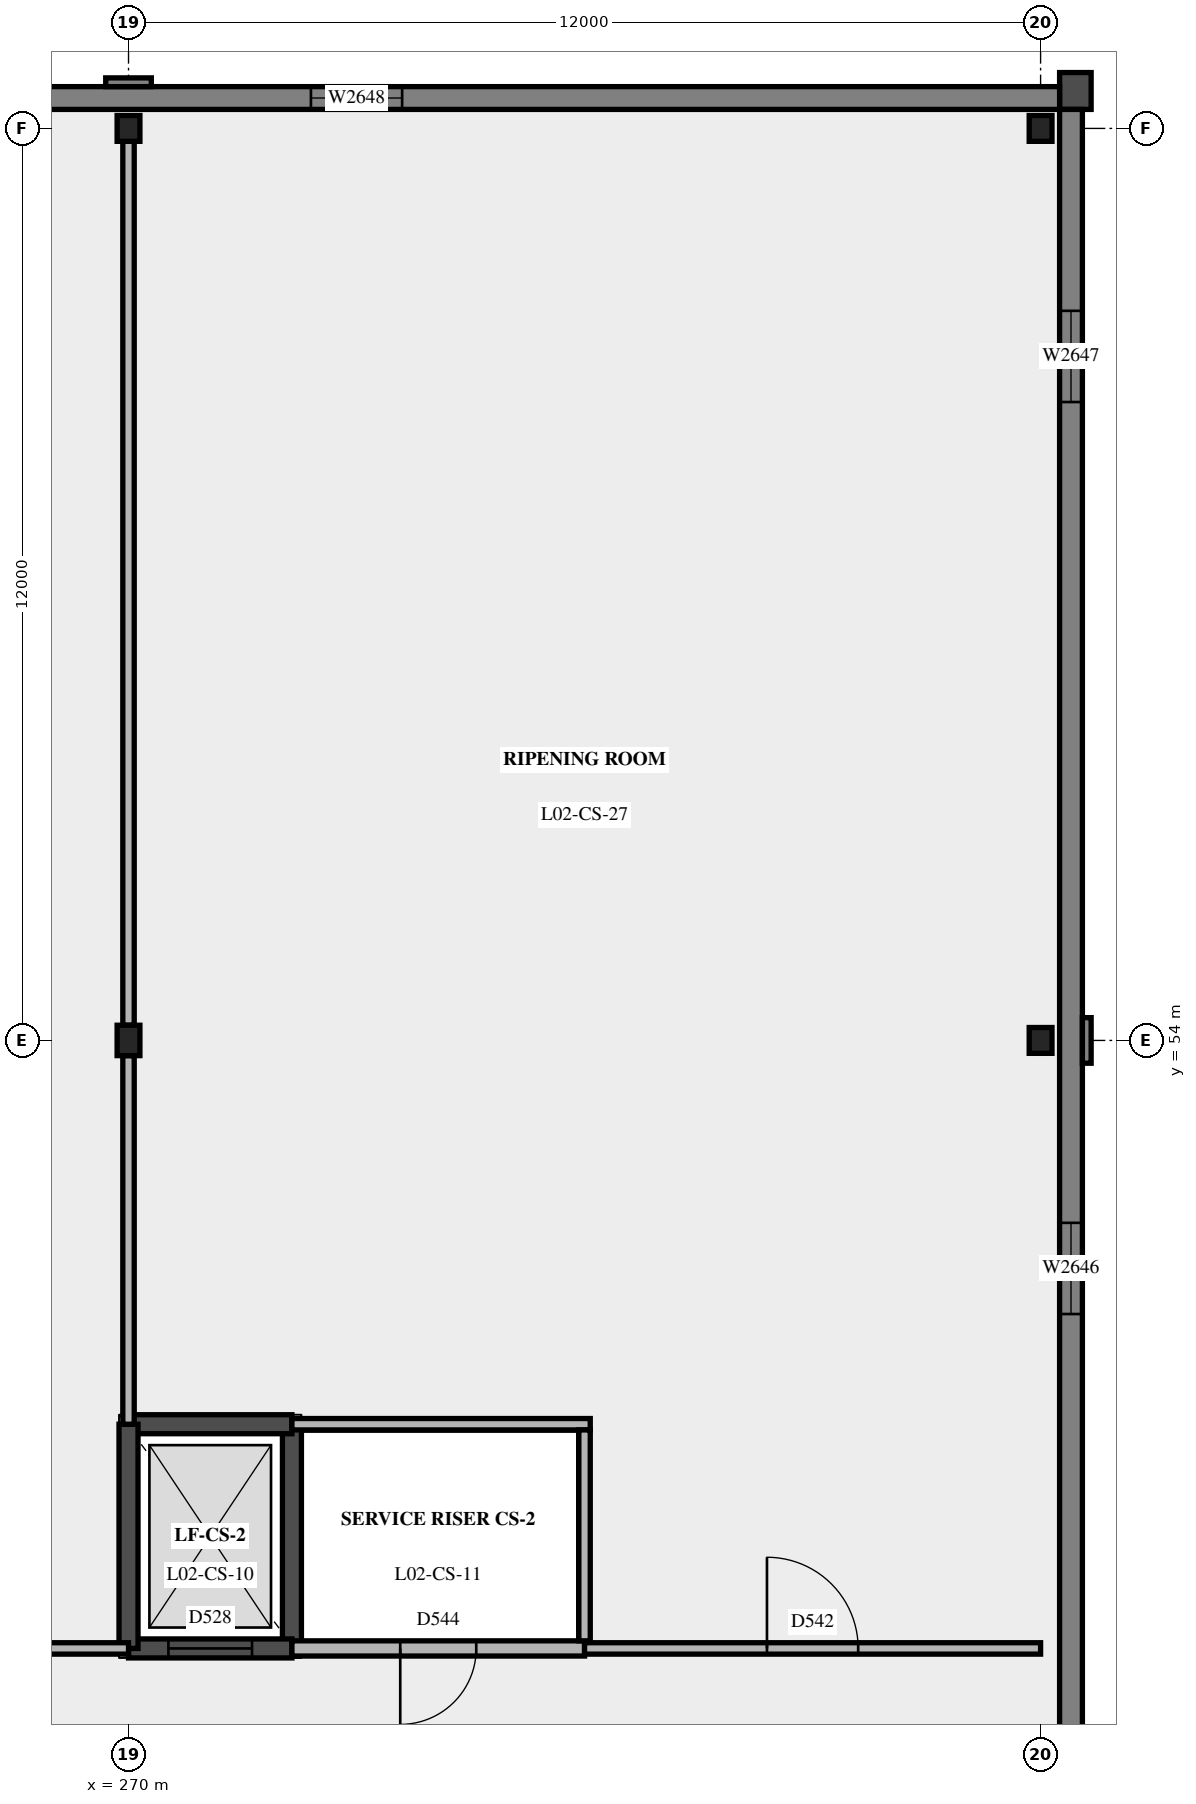
"""IFC4 building model, lengths in metres.
Left out: names, types, materials, properties, quantities, classifications, styles, units other than length and angle.
Written with IfcOpenShell. Run it as: python <this file> out.ifc"""

import sys

from ifc_helpers import new_model, si_unit, direction, frame, frame_2d, origin, origin_2d, place, context, subcontext, project, spatial, polyline, rectangle, i_section, outline, extrude, element, fill, save


model = new_model("IFC4")
c1 = context("Model", 3, precision=1e-05, world=origin(), true_north=direction((0.0, 1.0)))
c2 = subcontext(c1, "Body", "Model", "MODEL_VIEW")
j1 = project(units=[si_unit("LENGTHUNIT", "METRE"), si_unit("PLANEANGLEUNIT", "RADIAN")], contexts=[c1])
p1 = place(None, origin())
s1 = spatial("IfcSite", under=j1, at=p1, CompositionType="ELEMENT")
p2 = place(p1, origin())
s2 = spatial("IfcBuilding", under=s1, at=p2, CompositionType="ELEMENT")
p3 = place(p2, frame((0.0, 0.0, 10.8)))
s3 = spatial("IfcBuildingStorey", under=s2, at=p3, CompositionType="ELEMENT", Elevation=10.8)
p4 = place(p3, frame((270.0, 54.0, 0.0), z_axis=(0.0, 0.0, 1.0), x_axis=(1.0, 0.0, 0.0)))
e1 = element("IfcColumn", 1, at=p4, inside=s3, PredefinedType="COLUMN", context=c2, shape_type="SweptSolid", body=[
    extrude(i_section(OverallWidth=0.3, OverallDepth=0.4, WebThickness=0.013, FlangeThickness=0.024, at=origin_2d()), origin(), (0.0, 0.0, 1.0), 5.4),
])
for number, where, z_axis, x_axis in (
    (2, (270.0, 66.0, 0.0), (0.0, 0.0, 1.0), (1.0, 0.0, 0.0)),
    (3, (282.0, 54.0, 0.0), (0.0, 0.0, 1.0), (1.0, 0.0, 0.0)),
    (4, (282.0, 66.0, 0.0), (0.0, 0.0, 1.0), (1.0, 0.0, 0.0)),
):
    element("IfcColumn", number, at=place(p3, frame(where, z_axis=z_axis, x_axis=x_axis)), inside=s3, PredefinedType="COLUMN", context=c2, shape_type="SweptSolid", body=[
        extrude(i_section(OverallWidth=0.3, OverallDepth=0.34, WebThickness=0.012, FlangeThickness=0.021, at=origin_2d()), origin(), (0.0, 0.0, 1.0), 5.4),
    ])
p5 = place(p3, frame((282.25, 66.492, 0.0), z_axis=(0.0, 0.0, 1.0), x_axis=(1.0, 0.0, 0.0)))
e5 = element("IfcWall", 5, at=p5, inside=s3, PredefinedType="SOLIDWALL", context=c2, shape_type="SweptSolid", body=[
    extrude(rectangle(XDim=0.415, YDim=0.485, at=frame_2d((0.208, 0.0))), origin(), (0.0, 0.0, 1.0), 5.01),
])
p6 = place(p3, frame((282.25, 66.528, 5.01), z_axis=(0.0, 0.0, 1.0), x_axis=(1.0, 0.0, 0.0)))
e6 = element("IfcWall", 6, at=p6, inside=s3, PredefinedType="SOLIDWALL", context=c2, shape_type="SweptSolid", body=[
    extrude(rectangle(XDim=0.53, YDim=0.555, at=frame_2d((0.265, 0.0))), origin(), (0.0, 0.0, 1.0), 0.13),
])
p7 = place(p3, frame((282.25, 66.562, 5.14), z_axis=(0.0, 0.0, 1.0), x_axis=(1.0, 0.0, 0.0)))
e7 = element("IfcWall", 7, at=p7, inside=s3, PredefinedType="SOLIDWALL", context=c2, shape_type="SweptSolid", body=[
    extrude(rectangle(XDim=0.645, YDim=0.625, at=frame_2d((0.323, 0.0))), origin(), (0.0, 0.0, 1.0), 0.13),
])
p8 = place(p3, frame((282.25, 66.597, 5.27), z_axis=(0.0, 0.0, 1.0), x_axis=(1.0, 0.0, 0.0)))
e8 = element("IfcWall", 8, at=p8, inside=s3, PredefinedType="SOLIDWALL", context=c2, shape_type="SweptSolid", body=[
    extrude(rectangle(XDim=0.76, YDim=0.695, at=frame_2d((0.38, 0.0))), origin(), (0.0, 0.0, 1.0), 0.13),
])
p9 = place(p3, frame((282.4, 17.75, 0.0), z_axis=(0.0, 0.0, 1.0), x_axis=(0.0, 1.0, 0.0)))
e9 = element("IfcWall", 9, at=p9, inside=s3, PredefinedType="SOLIDWALL", context=c2, shape_type="SweptSolid", body=[
    extrude(rectangle(XDim=48.5, YDim=0.3, at=frame_2d((24.25, 0.0))), origin(), (0.0, 0.0, 1.0), 5.4),
])
p10 = place(p9, frame((8.65, 0.0, 1.2)))
e10 = element("IfcOpeningElement", 10, at=p10, cuts=e9, PredefinedType="OPENING", context=c2, shape_type="SweptSolid", body=[
    extrude(rectangle(XDim=1.2, YDim=1.5, at=frame_2d((0.6, 0.75))), frame((0.0, 0.16, 0.0), z_axis=(0.0, -1.0, 0.0), x_axis=(1.0, 0.0, 0.0)), (0.0, 0.0, 1.0), 0.32),
])
p11 = place(p9, frame((20.65, 0.0, 1.2)))
e11 = element("IfcOpeningElement", 11, at=p11, cuts=e9, PredefinedType="OPENING", context=c2, shape_type="SweptSolid", body=[
    extrude(rectangle(XDim=1.2, YDim=1.5, at=frame_2d((0.6, 0.75))), frame((0.0, 0.16, 0.0), z_axis=(0.0, -1.0, 0.0), x_axis=(1.0, 0.0, 0.0)), (0.0, 0.0, 1.0), 0.32),
])
p12 = place(p9, frame((32.65, 0.0, 1.2)))
e12 = element("IfcOpeningElement", 12, at=p12, cuts=e9, PredefinedType="OPENING", context=c2, shape_type="SweptSolid", body=[
    extrude(rectangle(XDim=1.2, YDim=1.5, at=frame_2d((0.6, 0.75))), frame((0.0, 0.16, 0.0), z_axis=(0.0, -1.0, 0.0), x_axis=(1.0, 0.0, 0.0)), (0.0, 0.0, 1.0), 0.32),
])
p13 = place(p9, frame((44.65, 0.0, 1.2)))
e13 = element("IfcOpeningElement", 13, at=p13, cuts=e9, PredefinedType="OPENING", context=c2, shape_type="SweptSolid", body=[
    extrude(rectangle(XDim=1.2, YDim=1.5, at=frame_2d((0.6, 0.75))), frame((0.0, 0.16, 0.0), z_axis=(0.0, -1.0, 0.0), x_axis=(1.0, 0.0, 0.0)), (0.0, 0.0, 1.0), 0.32),
])
p14 = place(p3, frame((282.607, 53.7, 0.0), z_axis=(0.0, 0.0, 1.0), x_axis=(0.0, 1.0, 0.0)))
e14 = element("IfcWall", 14, at=p14, inside=s3, PredefinedType="SOLIDWALL", context=c2, shape_type="SweptSolid", body=[
    extrude(rectangle(XDim=0.6, YDim=0.115, at=frame_2d((0.3, 0.0))), origin(), (0.0, 0.0, 1.0), 5.4),
])
p15 = place(p3, frame((282.25, 66.4, 0.0), z_axis=(0.0, 0.0, 1.0), x_axis=(-1.0, 0.0, 0.0)))
e15 = element("IfcWall", 15, at=p15, inside=s3, PredefinedType="SOLIDWALL", context=c2, shape_type="SweptSolid", body=[
    extrude(rectangle(XDim=84.5, YDim=0.3, at=frame_2d((42.25, 0.0))), origin(), (0.0, 0.0, 1.0), 5.4),
])
p16 = place(p15, frame((8.65, 0.0, 1.2)))
e16 = element("IfcOpeningElement", 16, at=p16, cuts=e15, PredefinedType="OPENING", context=c2, shape_type="SweptSolid", body=[
    extrude(rectangle(XDim=1.2, YDim=1.5, at=frame_2d((0.6, 0.75))), frame((0.0, 0.16, 0.0), z_axis=(0.0, -1.0, 0.0), x_axis=(1.0, 0.0, 0.0)), (0.0, 0.0, 1.0), 0.32),
])
p17 = place(p15, frame((20.65, 0.0, 1.2)))
e17 = element("IfcOpeningElement", 17, at=p17, cuts=e15, PredefinedType="OPENING", context=c2, shape_type="SweptSolid", body=[
    extrude(rectangle(XDim=1.2, YDim=1.5, at=frame_2d((0.6, 0.75))), frame((0.0, 0.16, 0.0), z_axis=(0.0, -1.0, 0.0), x_axis=(1.0, 0.0, 0.0)), (0.0, 0.0, 1.0), 0.32),
])
p18 = place(p15, frame((32.65, 0.0, 1.2)))
e18 = element("IfcOpeningElement", 18, at=p18, cuts=e15, PredefinedType="OPENING", context=c2, shape_type="SweptSolid", body=[
    extrude(rectangle(XDim=1.2, YDim=1.5, at=frame_2d((0.6, 0.75))), frame((0.0, 0.16, 0.0), z_axis=(0.0, -1.0, 0.0), x_axis=(1.0, 0.0, 0.0)), (0.0, 0.0, 1.0), 0.32),
])
p19 = place(p15, frame((44.65, 0.0, 1.2)))
e19 = element("IfcOpeningElement", 19, at=p19, cuts=e15, PredefinedType="OPENING", context=c2, shape_type="SweptSolid", body=[
    extrude(rectangle(XDim=1.2, YDim=1.5, at=frame_2d((0.6, 0.75))), frame((0.0, 0.16, 0.0), z_axis=(0.0, -1.0, 0.0), x_axis=(1.0, 0.0, 0.0)), (0.0, 0.0, 1.0), 0.32),
])
p20 = place(p15, frame((56.65, 0.0, 1.2)))
e20 = element("IfcOpeningElement", 20, at=p20, cuts=e15, PredefinedType="OPENING", context=c2, shape_type="SweptSolid", body=[
    extrude(rectangle(XDim=1.2, YDim=1.5, at=frame_2d((0.6, 0.75))), frame((0.0, 0.16, 0.0), z_axis=(0.0, -1.0, 0.0), x_axis=(1.0, 0.0, 0.0)), (0.0, 0.0, 1.0), 0.32),
])
p21 = place(p15, frame((68.65, 0.0, 1.2)))
e21 = element("IfcOpeningElement", 21, at=p21, cuts=e15, PredefinedType="OPENING", context=c2, shape_type="SweptSolid", body=[
    extrude(rectangle(XDim=1.2, YDim=1.5, at=frame_2d((0.6, 0.75))), frame((0.0, 0.16, 0.0), z_axis=(0.0, -1.0, 0.0), x_axis=(1.0, 0.0, 0.0)), (0.0, 0.0, 1.0), 0.32),
])
p22 = place(p15, frame((80.65, 0.0, 1.2)))
e22 = element("IfcOpeningElement", 22, at=p22, cuts=e15, PredefinedType="OPENING", context=c2, shape_type="SweptSolid", body=[
    extrude(rectangle(XDim=1.2, YDim=1.5, at=frame_2d((0.6, 0.75))), frame((0.0, 0.16, 0.0), z_axis=(0.0, -1.0, 0.0), x_axis=(1.0, 0.0, 0.0)), (0.0, 0.0, 1.0), 0.32),
])
p23 = place(p3, frame((270.3, 66.607, 0.0), z_axis=(0.0, 0.0, 1.0), x_axis=(-1.0, 0.0, 0.0)))
e23 = element("IfcWall", 23, at=p23, inside=s3, PredefinedType="SOLIDWALL", context=c2, shape_type="SweptSolid", body=[
    extrude(rectangle(XDim=0.6, YDim=0.115, at=frame_2d((0.3, 0.0))), origin(), (0.0, 0.0, 1.0), 5.4),
])
p24 = place(p3, frame((272.15, 46.0, 0.0), z_axis=(0.0, 0.0, 1.0), x_axis=(0.0, 1.0, 0.0)))
e24 = element("IfcWall", 24, at=p24, inside=s3, PredefinedType="SHEAR", context=c2, shape_type="SweptSolid", body=[
    extrude(rectangle(XDim=2.95, YDim=0.25, at=frame_2d((1.475, 0.0))), origin(), (0.0, 0.0, 1.0), 5.15),
])
p25 = place(p3, frame((272.15, 48.95, 0.0), z_axis=(0.0, 0.0, 1.0), x_axis=(-1.0, 0.0, 0.0)))
e25 = element("IfcWall", 25, at=p25, inside=s3, PredefinedType="SHEAR", context=c2, shape_type="SweptSolid", body=[
    extrude(rectangle(XDim=2.15, YDim=0.25, at=frame_2d((1.075, 0.0))), origin(), (0.0, 0.0, 1.0), 5.15),
])
p26 = place(p3, frame((270.0, 46.0, 0.0), z_axis=(0.0, 0.0, 1.0), x_axis=(1.0, 0.0, 0.0)))
e26 = element("IfcWall", 26, at=p26, inside=s3, PredefinedType="SHEAR", context=c2, shape_type="SweptSolid", body=[
    extrude(rectangle(XDim=2.15, YDim=0.25, at=frame_2d((1.075, 0.0))), origin(), (0.0, 0.0, 1.0), 5.15),
])
p27 = place(p26, frame((0.525, 0.0, 0.0)))
e27 = element("IfcOpeningElement", 27, at=p27, cuts=e26, PredefinedType="OPENING", context=c2, shape_type="SweptSolid", body=[
    extrude(rectangle(XDim=1.1, YDim=2.1, at=frame_2d((0.55, 1.05))), frame((0.0, 0.135, 0.0), z_axis=(0.0, -1.0, 0.0), x_axis=(1.0, 0.0, 0.0)), (0.0, 0.0, 1.0), 0.27),
])
p28 = place(p3, frame((270.0, 48.95, 0.0), z_axis=(0.0, 0.0, 1.0), x_axis=(0.0, -1.0, 0.0)))
e28 = element("IfcWall", 28, at=p28, inside=s3, PredefinedType="SHEAR", context=c2, shape_type="SweptSolid", body=[
    extrude(rectangle(XDim=2.95, YDim=0.25, at=frame_2d((1.475, 0.0))), origin(), (0.0, 0.0, 1.0), 5.15),
])
p29 = place(p3, frame((252.0, 46.0, 0.0), z_axis=(0.0, 0.0, 1.0), x_axis=(1.0, 0.0, 0.0)))
e29 = element("IfcWall", 29, at=p29, inside=s3, PredefinedType="PARTITIONING", context=c2, shape_type="SweptSolid", body=[
    extrude(outline(polyline([(0.0, 0.0), (18.0, 0.0), (18.0, 5.15), (15.705, 5.15), (15.7, 4.63), (15.5, 4.63), (15.495, 5.15), (13.305, 5.15), (13.3, 4.63), (13.1, 4.63), (13.095, 5.15), (10.905, 5.15), (10.9, 4.63), (10.7, 4.63), (10.695, 5.15), (8.505, 5.15), (8.5, 4.63), (8.3, 4.63), (8.295, 5.15), (6.1, 5.15), (6.095, 4.68), (5.905, 4.68), (5.9, 5.15), (3.705, 5.15), (3.7, 4.63), (3.5, 4.63), (3.495, 5.15), (1.305, 5.15), (1.3, 4.63), (1.1, 4.63), (1.095, 5.15), (0.0, 5.15), (0.0, 0.0)])), frame((0.0, 0.075, 0.0), z_axis=(0.0, -1.0, 0.0), x_axis=(1.0, 0.0, 0.0)), (0.0, 0.0, 1.0), 0.15),
])
p30 = place(p29, frame((8.4, 0.0, 0.0)))
e30 = element("IfcOpeningElement", 30, at=p30, cuts=e29, PredefinedType="OPENING", context=c2, shape_type="SweptSolid", body=[
    extrude(rectangle(XDim=1.2, YDim=2.4, at=frame_2d((0.6, 1.2))), frame((0.0, 0.085, 0.0), z_axis=(0.0, -1.0, 0.0), x_axis=(1.0, 0.0, 0.0)), (0.0, 0.0, 1.0), 0.17),
])
p31 = place(p3, frame((272.15, 46.0, 0.0), z_axis=(0.0, 0.0, 1.0), x_axis=(1.0, 0.0, 0.0)))
e31 = element("IfcWall", 31, at=p31, inside=s3, PredefinedType="PARTITIONING", context=c2, shape_type="SweptSolid", body=[
    extrude(outline(polyline([(0.0, 0.0), (3.85, 0.0), (3.85, 5.15), (2.755, 5.15), (2.75, 4.63), (2.55, 4.63), (2.545, 5.15), (0.355, 5.15), (0.35, 4.63), (0.15, 4.63), (0.145, 5.15), (0.0, 5.15), (0.0, 0.0)])), frame((0.0, 0.1, 0.0), z_axis=(0.0, -1.0, 0.0), x_axis=(1.0, 0.0, 0.0)), (0.0, 0.0, 1.0), 0.2),
])
p32 = place(p31, frame((1.425, 0.0, 0.0)))
e32 = element("IfcOpeningElement", 32, at=p32, cuts=e31, PredefinedType="OPENING", context=c2, shape_type="SweptSolid", body=[
    extrude(rectangle(XDim=1.0, YDim=2.1, at=frame_2d((0.5, 1.05))), frame((0.0, 0.11, 0.0), z_axis=(0.0, -1.0, 0.0), x_axis=(1.0, 0.0, 0.0)), (0.0, 0.0, 1.0), 0.22),
])
p33 = place(p3, frame((276.0, 46.0, 0.0), z_axis=(0.0, 0.0, 1.0), x_axis=(1.0, 0.0, 0.0)))
e33 = element("IfcWall", 33, at=p33, inside=s3, PredefinedType="PARTITIONING", context=c2, shape_type="SweptSolid", body=[
    extrude(outline(polyline([(0.0, 0.0), (6.0, 0.0), (6.0, 4.68), (5.905, 4.68), (5.9, 5.15), (3.705, 5.15), (3.7, 4.63), (3.5, 4.63), (3.495, 5.15), (1.305, 5.15), (1.3, 4.63), (1.1, 4.63), (1.095, 5.15), (0.0, 5.15), (0.0, 0.0)])), frame((0.0, 0.075, 0.0), z_axis=(0.0, -1.0, 0.0), x_axis=(1.0, 0.0, 0.0)), (0.0, 0.0, 1.0), 0.15),
])
p34 = place(p33, frame((2.4, 0.0, 0.0)))
e34 = element("IfcOpeningElement", 34, at=p34, cuts=e33, PredefinedType="OPENING", context=c2, shape_type="SweptSolid", body=[
    extrude(rectangle(XDim=1.2, YDim=2.4, at=frame_2d((0.6, 1.2))), frame((0.0, 0.085, 0.0), z_axis=(0.0, -1.0, 0.0), x_axis=(1.0, 0.0, 0.0)), (0.0, 0.0, 1.0), 0.17),
])
p35 = place(p3, frame((272.15, 48.95, 0.0), z_axis=(0.0, 0.0, 1.0), x_axis=(1.0, 0.0, 0.0)))
e35 = element("IfcWall", 35, at=p35, inside=s3, PredefinedType="PARTITIONING", context=c2, shape_type="SweptSolid", body=[
    extrude(outline(polyline([(0.0, 0.0), (3.925, 0.0), (3.925, 5.15), (2.755, 5.15), (2.75, 4.63), (2.55, 4.63), (2.545, 5.15), (0.355, 5.15), (0.35, 4.63), (0.15, 4.63), (0.145, 5.15), (0.0, 5.15), (0.0, 0.0)])), frame((0.0, 0.075, 0.0), z_axis=(0.0, -1.0, 0.0), x_axis=(1.0, 0.0, 0.0)), (0.0, 0.0, 1.0), 0.15),
])
p36 = place(p3, frame((270.0, 48.95, 0.0), z_axis=(0.0, 0.0, 1.0), x_axis=(0.0, 1.0, 0.0)))
e36 = element("IfcWall", 36, at=p36, inside=s3, PredefinedType="PARTITIONING", context=c2, shape_type="SweptSolid", body=[
    extrude(rectangle(XDim=4.85, YDim=0.15, at=frame_2d((2.425, 0.0))), origin(), (0.0, 0.0, 1.0), 4.68),
])
p37 = place(p3, frame((270.0, 54.2, 0.0), z_axis=(0.0, 0.0, 1.0), x_axis=(0.0, 1.0, 0.0)))
e37 = element("IfcWall", 37, at=p37, inside=s3, PredefinedType="PARTITIONING", context=c2, shape_type="SweptSolid", body=[
    extrude(rectangle(XDim=11.63, YDim=0.15, at=frame_2d((5.815, 0.0))), origin(), (0.0, 0.0, 1.0), 4.68),
])
p38 = place(p3, frame((276.0, 46.1, 0.0), z_axis=(0.0, 0.0, 1.0), x_axis=(0.0, 1.0, 0.0)))
e38 = element("IfcWall", 38, at=p38, inside=s3, PredefinedType="PARTITIONING", context=c2, shape_type="SweptSolid", body=[
    extrude(rectangle(XDim=2.775, YDim=0.15, at=frame_2d((1.387, 0.0))), origin(), (0.0, 0.0, 1.0), 5.15),
])
p39 = place(p12, origin())
e39 = element("IfcWindow", 39, at=p39, inside=s3, PartitioningType="SINGLE_PANEL", PredefinedType="WINDOW", context=c2, shape_type="SweptSolid", body=[
    extrude(rectangle(XDim=1.2, YDim=1.5, at=frame_2d((0.6, 0.75))), frame((0.0, 0.03, 0.0), z_axis=(0.0, -1.0, 0.0), x_axis=(1.0, 0.0, 0.0)), (0.0, 0.0, 1.0), 0.06),
])
fill(e12, e39)
p40 = place(p13, origin())
e40 = element("IfcWindow", 40, at=p40, inside=s3, PartitioningType="SINGLE_PANEL", PredefinedType="WINDOW", context=c2, shape_type="SweptSolid", body=[
    extrude(rectangle(XDim=1.2, YDim=1.5, at=frame_2d((0.6, 0.75))), frame((0.0, 0.03, 0.0), z_axis=(0.0, -1.0, 0.0), x_axis=(1.0, 0.0, 0.0)), (0.0, 0.0, 1.0), 0.06),
])
fill(e13, e40)
p41 = place(p16, origin())
e41 = element("IfcWindow", 41, at=p41, inside=s3, PartitioningType="SINGLE_PANEL", PredefinedType="WINDOW", context=c2, shape_type="SweptSolid", body=[
    extrude(rectangle(XDim=1.2, YDim=1.5, at=frame_2d((0.6, 0.75))), frame((0.0, 0.03, 0.0), z_axis=(0.0, -1.0, 0.0), x_axis=(1.0, 0.0, 0.0)), (0.0, 0.0, 1.0), 0.06),
])
fill(e16, e41)
p42 = place(p27, origin())
e42 = element("IfcDoor", 42, at=p42, inside=s3, OperationType="SLIDING_TO_LEFT", PredefinedType="DOOR", context=c2, shape_type="SweptSolid", body=[
    extrude(rectangle(XDim=1.1, YDim=2.1, at=frame_2d((0.55, 1.05))), frame((0.0, 0.025, 0.0), z_axis=(0.0, -1.0, 0.0), x_axis=(1.0, 0.0, 0.0)), (0.0, 0.0, 1.0), 0.05),
])
fill(e27, e42)
p43 = place(p34, origin())
e43 = element("IfcDoor", 43, at=p43, inside=s3, OperationType="SINGLE_SWING_LEFT", PredefinedType="DOOR", context=c2, shape_type="SweptSolid", body=[
    extrude(rectangle(XDim=1.2, YDim=2.4, at=frame_2d((0.6, 1.2))), frame((0.0, 0.025, 0.0), z_axis=(0.0, -1.0, 0.0), x_axis=(1.0, 0.0, 0.0)), (0.0, 0.0, 1.0), 0.05),
])
fill(e34, e43)
p44 = place(p32, origin())
e44 = element("IfcDoor", 44, at=p44, inside=s3, OperationType="SINGLE_SWING_RIGHT", PredefinedType="DOOR", context=c2, shape_type="SweptSolid", body=[
    extrude(rectangle(XDim=1.0, YDim=2.1, at=frame_2d((0.5, 1.05))), frame((0.0, 0.025, 0.0), z_axis=(0.0, -1.0, 0.0), x_axis=(1.0, 0.0, 0.0)), (0.0, 0.0, 1.0), 0.05),
])
fill(e32, e44)
save(model, sys.argv[1])
